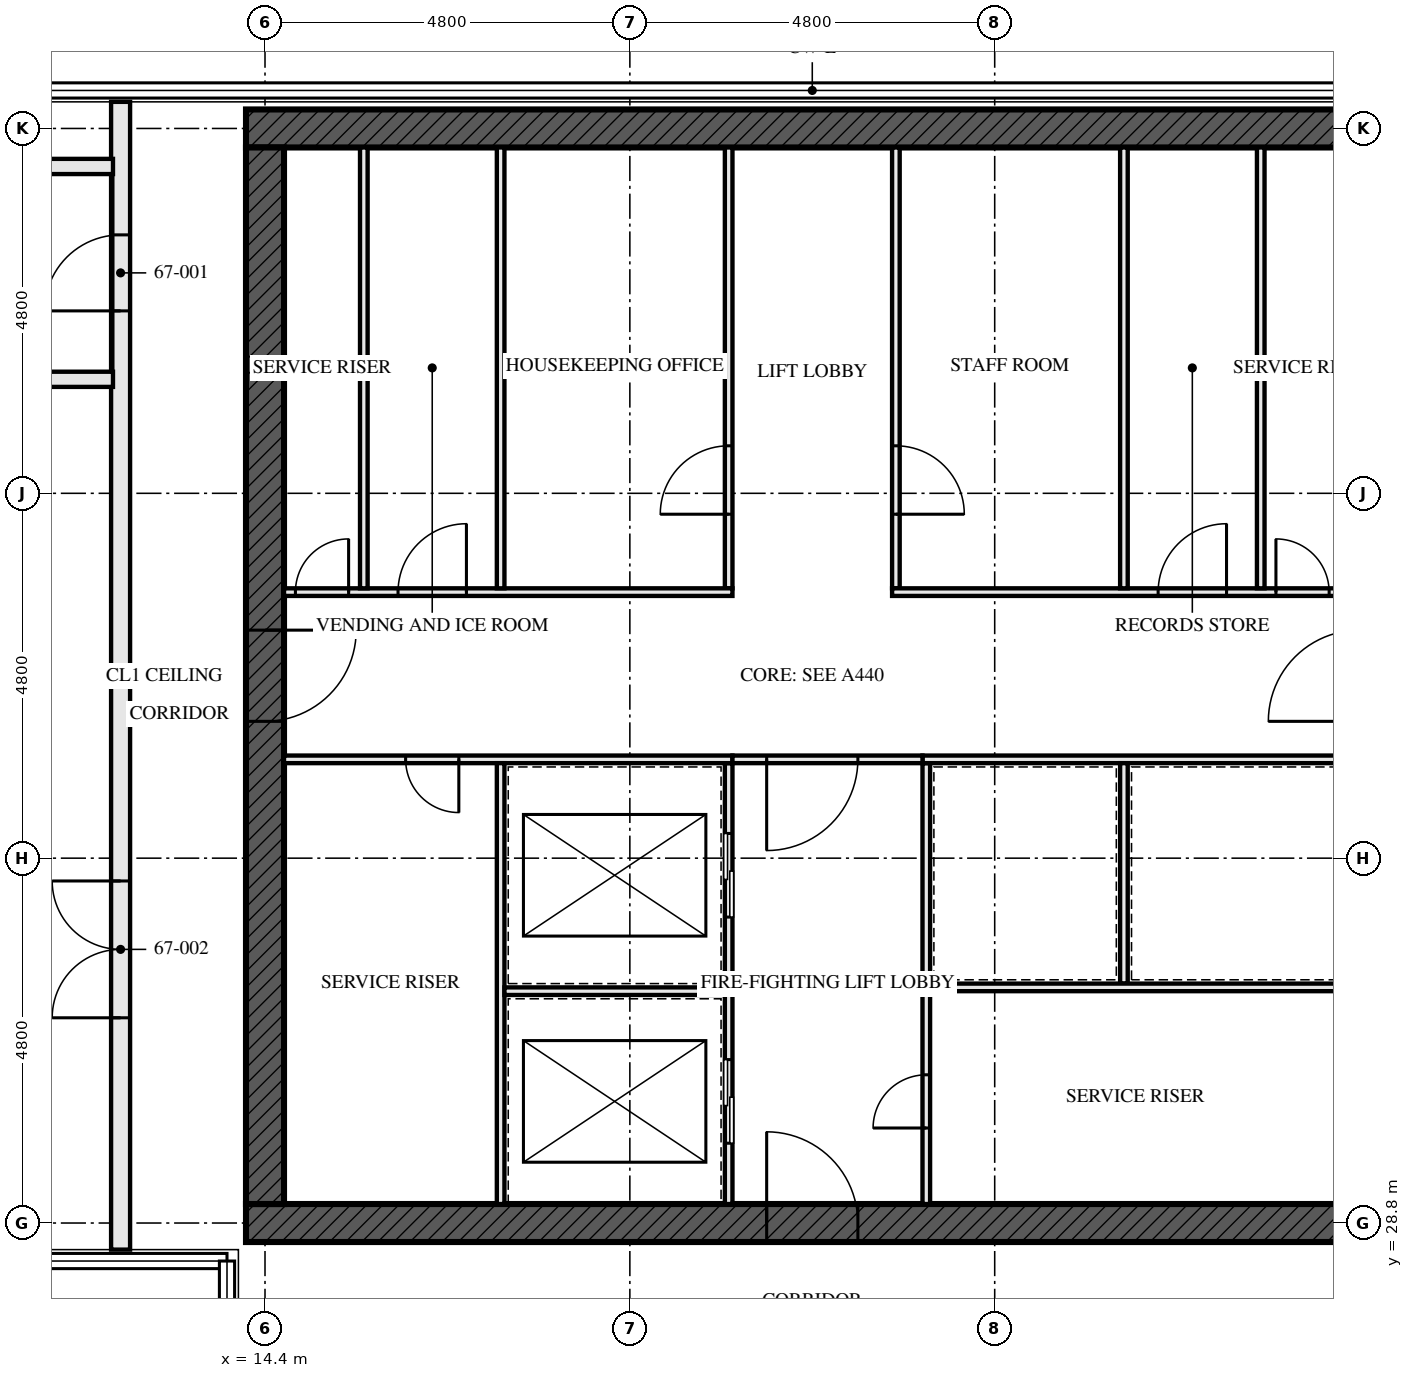
"""IFC4 building model, lengths in metres.
Left out: names, types, materials, properties, quantities, classifications, styles, units other than length and angle.
Written with IfcOpenShell. Run it as: python <this file> out.ifc"""

import sys

from ifc_helpers import new_model, si_unit, direction, frame, frame_2d, origin, place, context, subcontext, project, spatial, rectangle, extrude, element, fill, save


model = new_model("IFC4")
c1 = context("Model", 3, precision=1e-05, world=origin(), true_north=direction((0.0, 1.0)))
c2 = subcontext(c1, "Body", "Model", "MODEL_VIEW")
j1 = project(units=[si_unit("LENGTHUNIT", "METRE"), si_unit("PLANEANGLEUNIT", "RADIAN")], contexts=[c1])
p1 = place(None, origin())
s1 = spatial("IfcSite", under=j1, at=p1, CompositionType="ELEMENT")
p2 = place(p1, origin())
s2 = spatial("IfcBuilding", under=s1, at=p2, CompositionType="ELEMENT")
p3 = place(p2, frame((0.0, 0.0, 243.5)))
s3 = spatial("IfcBuildingStorey", under=s2, at=p3, CompositionType="ELEMENT", Elevation=243.5)
p4 = place(p3, frame((14.15, 28.8, -0.25), z_axis=(0.0, 0.0, 1.0), x_axis=(1.0, 0.0, 0.0)))
e1 = element("IfcWall", 1, at=p4, inside=s3, PredefinedType="SHEAR", context=c2, shape_type="SweptSolid", body=[
    extrude(rectangle(XDim=14.9, YDim=0.5, at=frame_2d((7.45, 0.0))), origin(), (0.0, 0.0, 1.0), 4.5),
])
p5 = place(p4, frame((6.85, 0.0, 0.25)))
e2 = element("IfcOpeningElement", 2, at=p5, cuts=e1, PredefinedType="OPENING", context=c2, shape_type="SweptSolid", body=[
    extrude(rectangle(XDim=1.2, YDim=2.1, at=frame_2d((0.6, 1.05))), frame((0.0, 0.26, 0.0), z_axis=(0.0, -1.0, 0.0), x_axis=(1.0, 0.0, 0.0)), (0.0, 0.0, 1.0), 0.521),
])
p6 = place(p3, frame((29.05, 43.2, -0.25), z_axis=(0.0, 0.0, 1.0), x_axis=(-1.0, 0.0, 0.0)))
e3 = element("IfcWall", 3, at=p6, inside=s3, PredefinedType="SHEAR", context=c2, shape_type="SweptSolid", body=[
    extrude(rectangle(XDim=14.9, YDim=0.5, at=frame_2d((7.45, 0.0))), origin(), (0.0, 0.0, 1.0), 4.5),
])
p7 = place(p3, frame((14.4, 42.95, -0.25), z_axis=(0.0, 0.0, 1.0), x_axis=(0.0, -1.0, 0.0)))
e4 = element("IfcWall", 4, at=p7, inside=s3, PredefinedType="SHEAR", context=c2, shape_type="SweptSolid", body=[
    extrude(rectangle(XDim=13.9, YDim=0.5, at=frame_2d((6.95, 0.0))), origin(), (0.0, 0.0, 1.0), 4.5),
])
p8 = place(p7, frame((6.35, 0.0, 0.25)))
e5 = element("IfcOpeningElement", 5, at=p8, cuts=e4, PredefinedType="OPENING", context=c2, shape_type="SweptSolid", body=[
    extrude(rectangle(XDim=1.2, YDim=2.1, at=frame_2d((0.6, 1.05))), frame((0.0, 0.26, 0.0), z_axis=(0.0, -1.0, 0.0), x_axis=(1.0, 0.0, 0.0)), (0.0, 0.0, 1.0), 0.521),
])
for number, where, z_axis, x_axis in (
    (6, (7.7, 42.7, 0.0), (0.0, 0.0, 1.0), (1.0, 0.0, 0.0)),
    (7, (7.7, 39.9, 0.0), (0.0, 0.0, 1.0), (1.0, 0.0, 0.0)),
):
    element("IfcWall", number, at=place(p3, frame(where, z_axis=z_axis, x_axis=x_axis)), inside=s3, PredefinedType="SOLIDWALL", context=c2, shape_type="SweptSolid", body=[
        extrude(rectangle(XDim=4.7, YDim=0.2, at=frame_2d((2.35, 0.0))), origin(), (0.0, 0.0, 1.0), 4.25),
    ])
p9 = place(p3, frame((12.5, 43.55, 0.0), z_axis=(0.0, 0.0, 1.0), x_axis=(0.0, -1.0, 0.0)))
e8 = element("IfcWall", 8, at=p9, inside=s3, PredefinedType="SOLIDWALL", context=c2, shape_type="SweptSolid", body=[
    extrude(rectangle(XDim=15.1, YDim=0.25, at=frame_2d((7.55, 0.0))), origin(), (0.0, 0.0, 1.0), 3.232),
])
p10 = place(p9, frame((1.75, 0.0, 0.0)))
e9 = element("IfcOpeningElement", 9, at=p10, cuts=e8, PredefinedType="OPENING", context=c2, shape_type="SweptSolid", body=[
    extrude(rectangle(XDim=1.0, YDim=2.1, at=frame_2d((0.5, 1.05))), frame((0.0, 0.135, 0.0), z_axis=(0.0, -1.0, 0.0), x_axis=(1.0, 0.0, 0.0)), (0.0, 0.0, 1.0), 0.271),
])
p11 = place(p9, frame((10.25, 0.0, 0.0)))
e10 = element("IfcOpeningElement", 10, at=p11, cuts=e8, PredefinedType="OPENING", context=c2, shape_type="SweptSolid", body=[
    extrude(rectangle(XDim=1.8, YDim=2.4, at=frame_2d((0.9, 1.2))), frame((0.0, 0.135, 0.0), z_axis=(0.0, -1.0, 0.0), x_axis=(1.0, 0.0, 0.0)), (0.0, 0.0, 1.0), 0.271),
])
for number, where, z_axis, x_axis in (
    (11, (15.7, 37.15, 0.0), (0.0, 0.0, 1.0), (0.0, 1.0, 0.0)),
    (12, (27.5, 37.15, 0.0), (0.0, 0.0, 1.0), (0.0, 1.0, 0.0)),
):
    element("IfcWall", number, at=place(p3, frame(where, z_axis=z_axis, x_axis=x_axis)), inside=s3, PredefinedType="SOLIDWALL", context=c2, shape_type="SweptSolid", body=[
        extrude(rectangle(XDim=5.8, YDim=0.1, at=frame_2d((2.9, 0.0))), origin(), (0.0, 0.0, 1.0), 4.25),
    ])
p12 = place(p3, frame((20.5, 29.05, 0.0), z_axis=(0.0, 0.0, 1.0), x_axis=(0.0, 1.0, 0.0)))
e13 = element("IfcWall", 13, at=p12, inside=s3, PredefinedType="SOLIDWALL", context=c2, shape_type="SweptSolid", body=[
    extrude(rectangle(XDim=5.8, YDim=0.1, at=frame_2d((2.9, 0.0))), origin(), (0.0, 0.0, 1.0), 4.25),
])
p13 = place(p12, frame((0.8, 0.0, 0.0)))
e14 = element("IfcOpeningElement", 14, at=p13, cuts=e13, PredefinedType="OPENING", context=c2, shape_type="SweptSolid", body=[
    extrude(rectangle(XDim=1.1, YDim=2.3, at=frame_2d((0.55, 1.15))), frame((0.0, 0.061, 0.0), z_axis=(0.0, -1.0, 0.0), x_axis=(1.0, 0.0, 0.0)), (0.0, 0.0, 1.0), 0.121),
])
p14 = place(p12, frame((3.775, 0.0, 0.0)))
e15 = element("IfcOpeningElement", 15, at=p14, cuts=e13, PredefinedType="OPENING", context=c2, shape_type="SweptSolid", body=[
    extrude(rectangle(XDim=1.1, YDim=2.3, at=frame_2d((0.55, 1.15))), frame((0.0, 0.061, 0.0), z_axis=(0.0, -1.0, 0.0), x_axis=(1.0, 0.0, 0.0)), (0.0, 0.0, 1.0), 0.121),
])
p15 = place(p3, frame((20.5, 37.15, 0.0), z_axis=(0.0, 0.0, 1.0), x_axis=(0.0, 1.0, 0.0)))
e16 = element("IfcWall", 16, at=p15, inside=s3, PredefinedType="SOLIDWALL", context=c2, shape_type="SweptSolid", body=[
    extrude(rectangle(XDim=5.8, YDim=0.1, at=frame_2d((2.9, 0.0))), origin(), (0.0, 0.0, 1.0), 4.25),
])
p16 = place(p15, frame((0.975, 0.0, 0.0)))
e17 = element("IfcOpeningElement", 17, at=p16, cuts=e16, PredefinedType="OPENING", context=c2, shape_type="SweptSolid", body=[
    extrude(rectangle(XDim=0.9, YDim=2.1, at=frame_2d((0.45, 1.05))), frame((0.0, 0.061, 0.0), z_axis=(0.0, -1.0, 0.0), x_axis=(1.0, 0.0, 0.0)), (0.0, 0.0, 1.0), 0.121),
])
p17 = place(p3, frame((22.7, 37.15, 0.0), z_axis=(0.0, 0.0, 1.0), x_axis=(0.0, 1.0, 0.0)))
e18 = element("IfcWall", 18, at=p17, inside=s3, PredefinedType="SOLIDWALL", context=c2, shape_type="SweptSolid", body=[
    extrude(rectangle(XDim=5.8, YDim=0.1, at=frame_2d((2.9, 0.0))), origin(), (0.0, 0.0, 1.0), 4.25),
])
p18 = place(p17, frame((0.975, 0.0, 0.0)))
e19 = element("IfcOpeningElement", 19, at=p18, cuts=e18, PredefinedType="OPENING", context=c2, shape_type="SweptSolid", body=[
    extrude(rectangle(XDim=0.9, YDim=2.1, at=frame_2d((0.45, 1.05))), frame((0.0, 0.061, 0.0), z_axis=(0.0, -1.0, 0.0), x_axis=(1.0, 0.0, 0.0)), (0.0, 0.0, 1.0), 0.121),
])
p19 = place(p3, frame((23.1, 29.05, 0.0), z_axis=(0.0, 0.0, 1.0), x_axis=(0.0, 1.0, 0.0)))
e20 = element("IfcWall", 20, at=p19, inside=s3, PredefinedType="SOLIDWALL", context=c2, shape_type="SweptSolid", body=[
    extrude(rectangle(XDim=5.8, YDim=0.1, at=frame_2d((2.9, 0.0))), origin(), (0.0, 0.0, 1.0), 4.25),
])
p20 = place(p19, frame((1.0, 0.0, 0.0)))
e21 = element("IfcOpeningElement", 21, at=p20, cuts=e20, PredefinedType="OPENING", context=c2, shape_type="SweptSolid", body=[
    extrude(rectangle(XDim=0.7, YDim=2.1, at=frame_2d((0.35, 1.05))), frame((0.0, 0.061, 0.0), z_axis=(0.0, -1.0, 0.0), x_axis=(1.0, 0.0, 0.0)), (0.0, 0.0, 1.0), 0.121),
])
p21 = place(p3, frame((14.65, 34.9, 0.0), z_axis=(0.0, 0.0, 1.0), x_axis=(1.0, 0.0, 0.0)))
e22 = element("IfcWall", 22, at=p21, inside=s3, PredefinedType="SOLIDWALL", context=c2, shape_type="SweptSolid", body=[
    extrude(rectangle(XDim=5.9, YDim=0.1, at=frame_2d((2.95, 0.0))), origin(), (0.0, 0.0, 1.0), 4.25),
])
p22 = place(p21, frame((1.6, 0.0, 0.0)))
e23 = element("IfcOpeningElement", 23, at=p22, cuts=e22, PredefinedType="OPENING", context=c2, shape_type="SweptSolid", body=[
    extrude(rectangle(XDim=0.7, YDim=2.1, at=frame_2d((0.35, 1.05))), frame((0.0, 0.061, 0.0), z_axis=(0.0, -1.0, 0.0), x_axis=(1.0, 0.0, 0.0)), (0.0, 0.0, 1.0), 0.121),
])
p23 = place(p3, frame((23.05, 34.9, 0.0), z_axis=(0.0, 0.0, 1.0), x_axis=(1.0, 0.0, 0.0)))
e24 = element("IfcWall", 24, at=p23, inside=s3, PredefinedType="SOLIDWALL", context=c2, shape_type="SweptSolid", body=[
    extrude(rectangle(XDim=5.5, YDim=0.1, at=frame_2d((2.75, 0.0))), origin(), (0.0, 0.0, 1.0), 4.25),
])
p24 = place(p3, frame((14.65, 37.1, 0.0), z_axis=(0.0, 0.0, 1.0), x_axis=(1.0, 0.0, 0.0)))
e25 = element("IfcWall", 25, at=p24, inside=s3, PredefinedType="SOLIDWALL", context=c2, shape_type="SweptSolid", body=[
    extrude(rectangle(XDim=5.9, YDim=0.1, at=frame_2d((2.95, 0.0))), origin(), (0.0, 0.0, 1.0), 4.25),
])
p25 = place(p24, frame((0.15, 0.0, 0.0)))
e26 = element("IfcOpeningElement", 26, at=p25, cuts=e25, PredefinedType="OPENING", context=c2, shape_type="SweptSolid", body=[
    extrude(rectangle(XDim=0.7, YDim=2.1, at=frame_2d((0.35, 1.05))), frame((0.0, 0.061, 0.0), z_axis=(0.0, -1.0, 0.0), x_axis=(1.0, 0.0, 0.0)), (0.0, 0.0, 1.0), 0.121),
])
p26 = place(p24, frame((1.5, 0.0, 0.0)))
e27 = element("IfcOpeningElement", 27, at=p26, cuts=e25, PredefinedType="OPENING", context=c2, shape_type="SweptSolid", body=[
    extrude(rectangle(XDim=0.9, YDim=2.1, at=frame_2d((0.45, 1.05))), frame((0.0, 0.061, 0.0), z_axis=(0.0, -1.0, 0.0), x_axis=(1.0, 0.0, 0.0)), (0.0, 0.0, 1.0), 0.121),
])
p27 = place(p3, frame((22.65, 37.1, 0.0), z_axis=(0.0, 0.0, 1.0), x_axis=(1.0, 0.0, 0.0)))
e28 = element("IfcWall", 28, at=p27, inside=s3, PredefinedType="SOLIDWALL", context=c2, shape_type="SweptSolid", body=[
    extrude(rectangle(XDim=5.9, YDim=0.1, at=frame_2d((2.95, 0.0))), origin(), (0.0, 0.0, 1.0), 4.25),
])
p28 = place(p27, frame((3.5, 0.0, 0.0)))
e29 = element("IfcOpeningElement", 29, at=p28, cuts=e28, PredefinedType="OPENING", context=c2, shape_type="SweptSolid", body=[
    extrude(rectangle(XDim=0.9, YDim=2.1, at=frame_2d((0.45, 1.05))), frame((0.0, 0.061, 0.0), z_axis=(0.0, -1.0, 0.0), x_axis=(1.0, 0.0, 0.0)), (0.0, 0.0, 1.0), 0.121),
])
p29 = place(p27, frame((5.05, 0.0, 0.0)))
e30 = element("IfcOpeningElement", 30, at=p29, cuts=e28, PredefinedType="OPENING", context=c2, shape_type="SweptSolid", body=[
    extrude(rectangle(XDim=0.7, YDim=2.1, at=frame_2d((0.35, 1.05))), frame((0.0, 0.061, 0.0), z_axis=(0.0, -1.0, 0.0), x_axis=(1.0, 0.0, 0.0)), (0.0, 0.0, 1.0), 0.121),
])
p30 = place(p3, frame((20.55, 34.9, 0.0), z_axis=(0.0, 0.0, 1.0), x_axis=(1.0, 0.0, 0.0)))
e31 = element("IfcWall", 31, at=p30, inside=s3, PredefinedType="SOLIDWALL", context=c2, shape_type="SweptSolid", body=[
    extrude(rectangle(XDim=2.5, YDim=0.1, at=frame_2d((1.25, 0.0))), origin(), (0.0, 0.0, 1.0), 4.25),
])
p31 = place(p30, frame((0.45, 0.0, 0.0)))
e32 = element("IfcOpeningElement", 32, at=p31, cuts=e31, PredefinedType="OPENING", context=c2, shape_type="SweptSolid", body=[
    extrude(rectangle(XDim=1.2, YDim=2.1, at=frame_2d((0.6, 1.05))), frame((0.0, 0.061, 0.0), z_axis=(0.0, -1.0, 0.0), x_axis=(1.0, 0.0, 0.0)), (0.0, 0.0, 1.0), 0.121),
])
p32 = place(p3, frame((17.5, 29.05, 0.0), z_axis=(0.0, 0.0, 1.0), x_axis=(0.0, 1.0, 0.0)))
e33 = element("IfcWall", 33, at=p32, inside=s3, PredefinedType="SOLIDWALL", context=c2, shape_type="SweptSolid", body=[
    extrude(rectangle(XDim=5.8, YDim=0.1, at=frame_2d((2.9, 0.0))), origin(), (0.0, 0.0, 1.0), 4.25),
])
p33 = place(p3, frame((17.55, 31.85, 0.0), z_axis=(0.0, 0.0, 1.0), x_axis=(1.0, 0.0, 0.0)))
e34 = element("IfcWall", 34, at=p33, inside=s3, PredefinedType="SOLIDWALL", context=c2, shape_type="SweptSolid", body=[
    extrude(rectangle(XDim=2.9, YDim=0.1, at=frame_2d((1.45, 0.0))), origin(), (0.0, 0.0, 1.0), 4.25),
])
for number, where, z_axis, x_axis in (
    (35, (17.5, 37.15, 0.0), (0.0, 0.0, 1.0), (0.0, 1.0, 0.0)),
    (36, (25.7, 37.15, 0.0), (0.0, 0.0, 1.0), (0.0, 1.0, 0.0)),
):
    element("IfcWall", number, at=place(p3, frame(where, z_axis=z_axis, x_axis=x_axis)), inside=s3, PredefinedType="SOLIDWALL", context=c2, shape_type="SweptSolid", body=[
        extrude(rectangle(XDim=5.8, YDim=0.1, at=frame_2d((2.9, 0.0))), origin(), (0.0, 0.0, 1.0), 4.25),
    ])
p34 = place(p3, frame((25.7, 31.95, 0.0), z_axis=(0.0, 0.0, 1.0), x_axis=(0.0, 1.0, 0.0)))
e37 = element("IfcWall", 37, at=p34, inside=s3, PredefinedType="SOLIDWALL", context=c2, shape_type="SweptSolid", body=[
    extrude(rectangle(XDim=2.9, YDim=0.1, at=frame_2d((1.45, 0.0))), origin(), (0.0, 0.0, 1.0), 4.25),
])
p35 = place(p3, frame((23.15, 31.9, 0.0), z_axis=(0.0, 0.0, 1.0), x_axis=(1.0, 0.0, 0.0)))
e38 = element("IfcWall", 38, at=p35, inside=s3, PredefinedType="SOLIDWALL", context=c2, shape_type="SweptSolid", body=[
    extrude(rectangle(XDim=5.4, YDim=0.1, at=frame_2d((2.7, 0.0))), origin(), (0.0, 0.0, 1.0), 4.25),
])
p36 = place(p10, frame((1.0, 0.0, 0.0), z_axis=(0.0, 0.0, 1.0), x_axis=(-1.0, 0.0, 0.0)))
e39 = element("IfcDoor", 39, at=p36, inside=s3, OperationType="SINGLE_SWING_RIGHT", PredefinedType="DOOR", context=c2, shape_type="SweptSolid", body=[
    extrude(rectangle(XDim=1.0, YDim=2.1, at=frame_2d((0.5, 1.05))), frame((0.0, 0.032, 0.0), z_axis=(0.0, -1.0, 0.0), x_axis=(1.0, 0.0, 0.0)), (0.0, 0.0, 1.0), 0.064),
])
fill(e9, e39)
p37 = place(p11, frame((1.8, 0.0, 0.0), z_axis=(0.0, 0.0, 1.0), x_axis=(-1.0, 0.0, 0.0)))
e40 = element("IfcDoor", 40, at=p37, inside=s3, OperationType="DOUBLE_DOOR_SINGLE_SWING", PredefinedType="DOOR", context=c2, shape_type="SweptSolid", body=[
    extrude(rectangle(XDim=1.8, YDim=2.4, at=frame_2d((0.9, 1.2))), frame((0.0, 0.032, 0.0), z_axis=(0.0, -1.0, 0.0), x_axis=(1.0, 0.0, 0.0)), (0.0, 0.0, 1.0), 0.064),
])
fill(e10, e40)
p38 = place(p13, origin())
e41 = element("IfcDoor", 41, at=p38, inside=s3, OperationType="SLIDING_TO_LEFT", PredefinedType="DOOR", context=c2, shape_type="SweptSolid", body=[
    extrude(rectangle(XDim=1.1, YDim=2.3, at=frame_2d((0.55, 1.15))), frame((0.0, 0.05, 0.0), z_axis=(0.0, -1.0, 0.0), x_axis=(1.0, 0.0, 0.0)), (0.0, 0.0, 1.0), 0.1),
])
fill(e14, e41)
p39 = place(p14, origin())
e42 = element("IfcDoor", 42, at=p39, inside=s3, OperationType="SLIDING_TO_LEFT", PredefinedType="DOOR", context=c2, shape_type="SweptSolid", body=[
    extrude(rectangle(XDim=1.1, YDim=2.3, at=frame_2d((0.55, 1.15))), frame((0.0, 0.05, 0.0), z_axis=(0.0, -1.0, 0.0), x_axis=(1.0, 0.0, 0.0)), (0.0, 0.0, 1.0), 0.1),
])
fill(e15, e42)
p40 = place(p16, origin())
e43 = element("IfcDoor", 43, at=p40, inside=s3, OperationType="SINGLE_SWING_RIGHT", PredefinedType="DOOR", context=c2, shape_type="SweptSolid", body=[
    extrude(rectangle(XDim=0.9, YDim=2.1, at=frame_2d((0.45, 1.05))), frame((0.0, 0.027, 0.0), z_axis=(0.0, -1.0, 0.0), x_axis=(1.0, 0.0, 0.0)), (0.0, 0.0, 1.0), 0.054),
])
fill(e17, e43)
p41 = place(p18, frame((0.9, 0.0, 0.0), z_axis=(0.0, 0.0, 1.0), x_axis=(-1.0, 0.0, 0.0)))
e44 = element("IfcDoor", 44, at=p41, inside=s3, OperationType="SINGLE_SWING_LEFT", PredefinedType="DOOR", context=c2, shape_type="SweptSolid", body=[
    extrude(rectangle(XDim=0.9, YDim=2.1, at=frame_2d((0.45, 1.05))), frame((0.0, 0.027, 0.0), z_axis=(0.0, -1.0, 0.0), x_axis=(1.0, 0.0, 0.0)), (0.0, 0.0, 1.0), 0.054),
])
fill(e19, e44)
p42 = place(p20, origin())
e45 = element("IfcDoor", 45, at=p42, inside=s3, OperationType="SINGLE_SWING_RIGHT", PredefinedType="DOOR", context=c2, shape_type="SweptSolid", body=[
    extrude(rectangle(XDim=0.7, YDim=2.1, at=frame_2d((0.35, 1.05))), frame((0.0, 0.027, 0.0), z_axis=(0.0, -1.0, 0.0), x_axis=(1.0, 0.0, 0.0)), (0.0, 0.0, 1.0), 0.054),
])
fill(e21, e45)
p43 = place(p22, frame((0.7, 0.0, 0.0), z_axis=(0.0, 0.0, 1.0), x_axis=(-1.0, 0.0, 0.0)))
e46 = element("IfcDoor", 46, at=p43, inside=s3, OperationType="SINGLE_SWING_RIGHT", PredefinedType="DOOR", context=c2, shape_type="SweptSolid", body=[
    extrude(rectangle(XDim=0.7, YDim=2.1, at=frame_2d((0.35, 1.05))), frame((0.0, 0.027, 0.0), z_axis=(0.0, -1.0, 0.0), x_axis=(1.0, 0.0, 0.0)), (0.0, 0.0, 1.0), 0.054),
])
fill(e23, e46)
p44 = place(p25, origin())
e47 = element("IfcDoor", 47, at=p44, inside=s3, OperationType="SINGLE_SWING_LEFT", PredefinedType="DOOR", context=c2, shape_type="SweptSolid", body=[
    extrude(rectangle(XDim=0.7, YDim=2.1, at=frame_2d((0.35, 1.05))), frame((0.0, 0.027, 0.0), z_axis=(0.0, -1.0, 0.0), x_axis=(1.0, 0.0, 0.0)), (0.0, 0.0, 1.0), 0.054),
])
fill(e26, e47)
p45 = place(p26, origin())
e48 = element("IfcDoor", 48, at=p45, inside=s3, OperationType="SINGLE_SWING_LEFT", PredefinedType="DOOR", context=c2, shape_type="SweptSolid", body=[
    extrude(rectangle(XDim=0.9, YDim=2.1, at=frame_2d((0.45, 1.05))), frame((0.0, 0.027, 0.0), z_axis=(0.0, -1.0, 0.0), x_axis=(1.0, 0.0, 0.0)), (0.0, 0.0, 1.0), 0.054),
])
fill(e27, e48)
p46 = place(p28, origin())
e49 = element("IfcDoor", 49, at=p46, inside=s3, OperationType="SINGLE_SWING_LEFT", PredefinedType="DOOR", context=c2, shape_type="SweptSolid", body=[
    extrude(rectangle(XDim=0.9, YDim=2.1, at=frame_2d((0.45, 1.05))), frame((0.0, 0.027, 0.0), z_axis=(0.0, -1.0, 0.0), x_axis=(1.0, 0.0, 0.0)), (0.0, 0.0, 1.0), 0.054),
])
fill(e29, e49)
p47 = place(p29, origin())
e50 = element("IfcDoor", 50, at=p47, inside=s3, OperationType="SINGLE_SWING_RIGHT", PredefinedType="DOOR", context=c2, shape_type="SweptSolid", body=[
    extrude(rectangle(XDim=0.7, YDim=2.1, at=frame_2d((0.35, 1.05))), frame((0.0, 0.027, 0.0), z_axis=(0.0, -1.0, 0.0), x_axis=(1.0, 0.0, 0.0)), (0.0, 0.0, 1.0), 0.054),
])
fill(e30, e50)
p48 = place(p31, frame((1.2, 0.0, 0.0), z_axis=(0.0, 0.0, 1.0), x_axis=(-1.0, 0.0, 0.0)))
e51 = element("IfcDoor", 51, at=p48, inside=s3, OperationType="SINGLE_SWING_LEFT", PredefinedType="DOOR", context=c2, shape_type="SweptSolid", body=[
    extrude(rectangle(XDim=1.2, YDim=2.1, at=frame_2d((0.6, 1.05))), frame((0.0, 0.027, 0.0), z_axis=(0.0, -1.0, 0.0), x_axis=(1.0, 0.0, 0.0)), (0.0, 0.0, 1.0), 0.054),
])
fill(e32, e51)
p49 = place(p5, origin())
e52 = element("IfcDoor", 52, at=p49, inside=s3, OperationType="SINGLE_SWING_LEFT", PredefinedType="DOOR", context=c2, shape_type="SweptSolid", body=[
    extrude(rectangle(XDim=1.2, YDim=2.1, at=frame_2d((0.6, 1.05))), frame((0.0, 0.027, 0.0), z_axis=(0.0, -1.0, 0.0), x_axis=(1.0, 0.0, 0.0)), (0.0, 0.0, 1.0), 0.054),
])
fill(e2, e52)
p50 = place(p8, origin())
e53 = element("IfcDoor", 53, at=p50, inside=s3, OperationType="SINGLE_SWING_LEFT", PredefinedType="DOOR", context=c2, shape_type="SweptSolid", body=[
    extrude(rectangle(XDim=1.2, YDim=2.1, at=frame_2d((0.6, 1.05))), frame((0.0, 0.027, 0.0), z_axis=(0.0, -1.0, 0.0), x_axis=(1.0, 0.0, 0.0)), (0.0, 0.0, 1.0), 0.054),
])
fill(e5, e53)
save(model, sys.argv[1])
